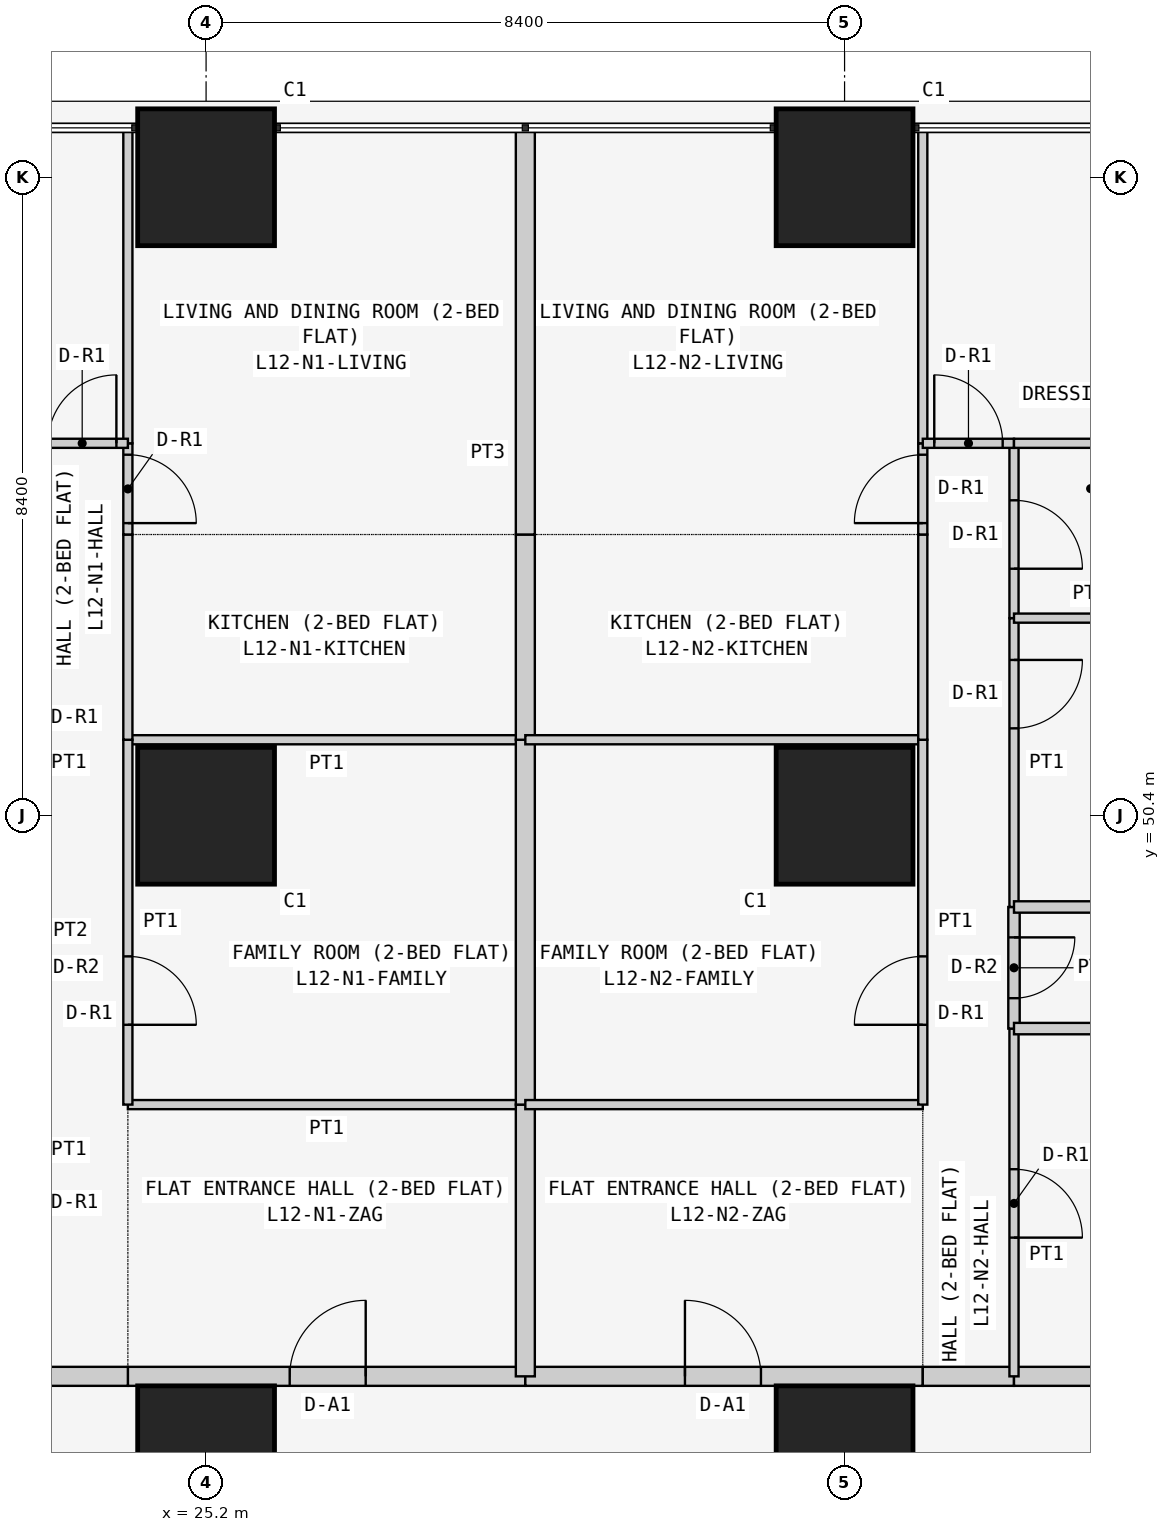
"""IFC4 building model, lengths in metres.
Left out: names, types, materials, properties, quantities, classifications, styles, units other than length and angle.
Written with IfcOpenShell. Run it as: python <this file> out.ifc"""

import sys

from ifc_helpers import new_model, si_unit, direction, frame, frame_2d, origin, origin_2d, place, context, subcontext, project, spatial, rectangle, extrude, element, fill, save


model = new_model("IFC4")
c1 = context("Model", 3, precision=1e-05, world=origin(), true_north=direction((0.0, 1.0)))
c2 = subcontext(c1, "Body", "Model", "MODEL_VIEW")
j1 = project(units=[si_unit("LENGTHUNIT", "METRE"), si_unit("PLANEANGLEUNIT", "RADIAN")], contexts=[c1])
p1 = place(None, origin())
s1 = spatial("IfcSite", under=j1, at=p1, CompositionType="ELEMENT")
p2 = place(p1, origin())
s2 = spatial("IfcBuilding", under=s1, at=p2, CompositionType="ELEMENT")
p3 = place(p2, frame((0.0, 0.0, 52.5)))
s3 = spatial("IfcBuildingStorey", under=s2, at=p3, CompositionType="ELEMENT", Elevation=52.5)
for number, where, z_axis, x_axis in (
    (1, (25.2, 42.0, 0.0), (0.0, 0.0, 1.0), (1.0, 0.0, 0.0)),
    (2, (25.2, 50.4, 0.0), (0.0, 0.0, 1.0), (1.0, 0.0, 0.0)),
    (3, (25.2, 58.8, 0.0), (0.0, 0.0, 1.0), (1.0, 0.0, 0.0)),
    (4, (33.6, 42.0, 0.0), (0.0, 0.0, 1.0), (1.0, 0.0, 0.0)),
    (5, (33.6, 50.4, 0.0), (0.0, 0.0, 1.0), (1.0, 0.0, 0.0)),
    (6, (33.6, 58.8, 0.0), (0.0, 0.0, 1.0), (1.0, 0.0, 0.0)),
):
    element("IfcColumn", number, at=place(p3, frame(where, z_axis=z_axis, x_axis=x_axis)), inside=s3, PredefinedType="COLUMN", context=c2, shape_type="SweptSolid", body=[
        extrude(rectangle(XDim=1.8, YDim=1.8, at=origin_2d()), origin(), (0.0, 0.0, 1.0), 3.6),
    ])
p4 = place(p3, frame((24.171, 43.025, 0.0), z_axis=(0.0, 0.0, 1.0), x_axis=(1.0, 0.0, 0.0)))
e7 = element("IfcWall", 7, at=p4, inside=s3, PredefinedType="PARTITIONING", context=c2, shape_type="SweptSolid", body=[
    extrude(rectangle(XDim=5.229, YDim=0.25, at=frame_2d((2.615, 0.0))), origin(), (0.0, 0.0, 1.0), 3.45),
])
p5 = place(p4, frame((2.129, 0.0, 0.0)))
e8 = element("IfcOpeningElement", 8, at=p5, cuts=e7, PredefinedType="OPENING", context=c2, shape_type="SweptSolid", body=[
    extrude(rectangle(XDim=1.0, YDim=2.1, at=frame_2d((0.5, 1.05))), frame((0.0, 0.135, 0.0), z_axis=(0.0, -1.0, 0.0), x_axis=(1.0, 0.0, 0.0)), (0.0, 0.0, 1.0), 0.27),
])
p6 = place(p3, frame((22.971, 43.025, 0.0), z_axis=(0.0, 0.0, 1.0), x_axis=(1.0, 0.0, 0.0)))
e9 = element("IfcWall", 9, at=p6, inside=s3, PredefinedType="PARTITIONING", context=c2, shape_type="SweptSolid", body=[
    extrude(rectangle(XDim=1.2, YDim=0.25, at=frame_2d((0.6, 0.0))), origin(), (0.0, 0.0, 1.0), 3.45),
])
p7 = place(p3, frame((29.4, 43.025, 0.0), z_axis=(0.0, 0.0, 1.0), x_axis=(1.0, 0.0, 0.0)))
e10 = element("IfcWall", 10, at=p7, inside=s3, PredefinedType="PARTITIONING", context=c2, shape_type="SweptSolid", body=[
    extrude(rectangle(XDim=5.229, YDim=0.25, at=frame_2d((2.615, 0.0))), origin(), (0.0, 0.0, 1.0), 3.45),
])
p8 = place(p7, frame((2.1, 0.0, 0.0)))
e11 = element("IfcOpeningElement", 11, at=p8, cuts=e10, PredefinedType="OPENING", context=c2, shape_type="SweptSolid", body=[
    extrude(rectangle(XDim=1.0, YDim=2.1, at=frame_2d((0.5, 1.05))), frame((0.0, 0.135, 0.0), z_axis=(0.0, -1.0, 0.0), x_axis=(1.0, 0.0, 0.0)), (0.0, 0.0, 1.0), 0.27),
])
p9 = place(p3, frame((34.629, 43.025, 0.0), z_axis=(0.0, 0.0, 1.0), x_axis=(1.0, 0.0, 0.0)))
e12 = element("IfcWall", 12, at=p9, inside=s3, PredefinedType="PARTITIONING", context=c2, shape_type="SweptSolid", body=[
    extrude(rectangle(XDim=1.2, YDim=0.25, at=frame_2d((0.6, 0.0))), origin(), (0.0, 0.0, 1.0), 3.45),
])
p10 = place(p3, frame((35.829, 43.025, 0.0), z_axis=(0.0, 0.0, 1.0), x_axis=(1.0, 0.0, 0.0)))
e13 = element("IfcWall", 13, at=p10, inside=s3, PredefinedType="PARTITIONING", context=c2, shape_type="SweptSolid", body=[
    extrude(rectangle(XDim=6.871, YDim=0.25, at=frame_2d((3.436, 0.0))), origin(), (0.0, 0.0, 1.0), 3.45),
])
p11 = place(p3, frame((29.4, 46.6, 0.0), z_axis=(0.0, 0.0, 1.0), x_axis=(-1.0, 0.0, 0.0)))
e14 = element("IfcWall", 14, at=p11, inside=s3, PredefinedType="PARTITIONING", context=c2, shape_type="SweptSolid", body=[
    extrude(rectangle(XDim=5.229, YDim=0.12, at=frame_2d((2.615, 0.0))), origin(), (0.0, 0.0, 1.0), 3.45),
])
p12 = place(p3, frame((29.4, 43.025, 0.0), z_axis=(0.0, 0.0, 1.0), x_axis=(0.0, 1.0, 0.0)))
e15 = element("IfcWall", 15, at=p12, inside=s3, PredefinedType="PARTITIONING", context=c2, shape_type="SweptSolid", body=[
    extrude(rectangle(XDim=3.575, YDim=0.25, at=frame_2d((1.788, 0.0))), origin(), (0.0, 0.0, 1.0), 2.848),
])
p13 = place(p3, frame((29.4, 51.4, 0.0), z_axis=(0.0, 0.0, 1.0), x_axis=(-1.0, 0.0, 0.0)))
e16 = element("IfcWall", 16, at=p13, inside=s3, PredefinedType="PARTITIONING", context=c2, shape_type="SweptSolid", body=[
    extrude(rectangle(XDim=5.229, YDim=0.12, at=frame_2d((2.615, 0.0))), origin(), (0.0, 0.0, 1.0), 3.45),
])
p14 = place(p3, frame((24.171, 51.4, 0.0), z_axis=(0.0, 0.0, 1.0), x_axis=(0.0, -1.0, 0.0)))
e17 = element("IfcWall", 17, at=p14, inside=s3, PredefinedType="PARTITIONING", context=c2, shape_type="SweptSolid", body=[
    extrude(rectangle(XDim=4.8, YDim=0.12, at=frame_2d((2.4, 0.0))), origin(), (0.0, 0.0, 1.0), 3.45),
])
p15 = place(p14, frame((2.85, 0.0, 0.0)))
e18 = element("IfcOpeningElement", 18, at=p15, cuts=e17, PredefinedType="OPENING", context=c2, shape_type="SweptSolid", body=[
    extrude(rectangle(XDim=0.9, YDim=2.1, at=frame_2d((0.45, 1.05))), frame((0.0, 0.07, 0.0), z_axis=(0.0, -1.0, 0.0), x_axis=(1.0, 0.0, 0.0)), (0.0, 0.0, 1.0), 0.14),
])
p16 = place(p3, frame((29.4, 46.6, 0.0), z_axis=(0.0, 0.0, 1.0), x_axis=(0.0, 1.0, 0.0)))
e19 = element("IfcWall", 19, at=p16, inside=s3, PredefinedType="PARTITIONING", context=c2, shape_type="SweptSolid", body=[
    extrude(rectangle(XDim=4.8, YDim=0.25, at=frame_2d((2.4, 0.0))), origin(), (0.0, 0.0, 1.0), 2.848),
])
p17 = place(p3, frame((24.171, 54.1, 0.0), z_axis=(0.0, 0.0, 1.0), x_axis=(0.0, -1.0, 0.0)))
e20 = element("IfcWall", 20, at=p17, inside=s3, PredefinedType="PARTITIONING", context=c2, shape_type="SweptSolid", body=[
    extrude(rectangle(XDim=2.7, YDim=0.12, at=frame_2d((1.35, 0.0))), origin(), (0.0, 0.0, 1.0), 3.45),
])
p18 = place(p3, frame((29.4, 51.4, 0.0), z_axis=(0.0, 0.0, 1.0), x_axis=(0.0, 1.0, 0.0)))
e21 = element("IfcWall", 21, at=p18, inside=s3, PredefinedType="PARTITIONING", context=c2, shape_type="SweptSolid", body=[
    extrude(rectangle(XDim=2.7, YDim=0.25, at=frame_2d((1.35, 0.0))), origin(), (0.0, 0.0, 1.0), 2.848),
])
p19 = place(p3, frame((24.171, 55.3, 0.0), z_axis=(0.0, 0.0, 1.0), x_axis=(0.0, -1.0, 0.0)))
e22 = element("IfcWall", 22, at=p19, inside=s3, PredefinedType="PARTITIONING", context=c2, shape_type="SweptSolid", body=[
    extrude(rectangle(XDim=1.2, YDim=0.12, at=frame_2d((0.6, 0.0))), origin(), (0.0, 0.0, 1.0), 3.45),
])
p20 = place(p19, frame((0.15, 0.0, 0.0)))
e23 = element("IfcOpeningElement", 23, at=p20, cuts=e22, PredefinedType="OPENING", context=c2, shape_type="SweptSolid", body=[
    extrude(rectangle(XDim=0.9, YDim=2.1, at=frame_2d((0.45, 1.05))), frame((0.0, 0.07, 0.0), z_axis=(0.0, -1.0, 0.0), x_axis=(1.0, 0.0, 0.0)), (0.0, 0.0, 1.0), 0.14),
])
p21 = place(p3, frame((24.171, 59.45, 0.0), z_axis=(0.0, 0.0, 1.0), x_axis=(0.0, -1.0, 0.0)))
e24 = element("IfcWall", 24, at=p21, inside=s3, PredefinedType="PARTITIONING", context=c2, shape_type="SweptSolid", body=[
    extrude(rectangle(XDim=4.15, YDim=0.12, at=frame_2d((2.075, 0.0))), origin(), (0.0, 0.0, 1.0), 3.45),
])
p22 = place(p3, frame((29.4, 54.1, 0.0), z_axis=(0.0, 0.0, 1.0), x_axis=(0.0, 1.0, 0.0)))
e25 = element("IfcWall", 25, at=p22, inside=s3, PredefinedType="PARTITIONING", context=c2, shape_type="SweptSolid", body=[
    extrude(rectangle(XDim=5.35, YDim=0.25, at=frame_2d((2.675, 0.0))), origin(), (0.0, 0.0, 1.0), 2.848),
])
p23 = place(p3, frame((24.171, 55.3, 0.0), z_axis=(0.0, 0.0, 1.0), x_axis=(-1.0, 0.0, 0.0)))
e26 = element("IfcWall", 26, at=p23, inside=s3, PredefinedType="PARTITIONING", context=c2, shape_type="SweptSolid", body=[
    extrude(rectangle(XDim=1.2, YDim=0.12, at=frame_2d((0.6, 0.0))), origin(), (0.0, 0.0, 1.0), 3.45),
])
p24 = place(p23, frame((0.151, 0.0, 0.0)))
e27 = element("IfcOpeningElement", 27, at=p24, cuts=e26, PredefinedType="OPENING", context=c2, shape_type="SweptSolid", body=[
    extrude(rectangle(XDim=0.9, YDim=2.1, at=frame_2d((0.45, 1.05))), frame((0.0, 0.07, 0.0), z_axis=(0.0, -1.0, 0.0), x_axis=(1.0, 0.0, 0.0)), (0.0, 0.0, 1.0), 0.14),
])
for number, where, z_axis, x_axis in (
    (28, (29.4, 46.6, 0.0), (0.0, 0.0, 1.0), (1.0, 0.0, 0.0)),
    (29, (29.4, 51.4, 0.0), (0.0, 0.0, 1.0), (1.0, 0.0, 0.0)),
):
    element("IfcWall", number, at=place(p3, frame(where, z_axis=z_axis, x_axis=x_axis)), inside=s3, PredefinedType="PARTITIONING", context=c2, shape_type="SweptSolid", body=[
        extrude(rectangle(XDim=5.229, YDim=0.12, at=frame_2d((2.615, 0.0))), origin(), (0.0, 0.0, 1.0), 3.45),
    ])
p25 = place(p3, frame((34.629, 51.4, 0.0), z_axis=(0.0, 0.0, 1.0), x_axis=(0.0, -1.0, 0.0)))
e30 = element("IfcWall", 30, at=p25, inside=s3, PredefinedType="PARTITIONING", context=c2, shape_type="SweptSolid", body=[
    extrude(rectangle(XDim=4.8, YDim=0.12, at=frame_2d((2.4, 0.0))), origin(), (0.0, 0.0, 1.0), 3.45),
])
p26 = place(p25, frame((2.85, 0.0, 0.0)))
e31 = element("IfcOpeningElement", 31, at=p26, cuts=e30, PredefinedType="OPENING", context=c2, shape_type="SweptSolid", body=[
    extrude(rectangle(XDim=0.9, YDim=2.1, at=frame_2d((0.45, 1.05))), frame((0.0, 0.07, 0.0), z_axis=(0.0, -1.0, 0.0), x_axis=(1.0, 0.0, 0.0)), (0.0, 0.0, 1.0), 0.14),
])
p27 = place(p3, frame((34.629, 54.1, 0.0), z_axis=(0.0, 0.0, 1.0), x_axis=(0.0, -1.0, 0.0)))
e32 = element("IfcWall", 32, at=p27, inside=s3, PredefinedType="PARTITIONING", context=c2, shape_type="SweptSolid", body=[
    extrude(rectangle(XDim=2.7, YDim=0.12, at=frame_2d((1.35, 0.0))), origin(), (0.0, 0.0, 1.0), 3.45),
])
p28 = place(p3, frame((34.629, 55.3, 0.0), z_axis=(0.0, 0.0, 1.0), x_axis=(0.0, -1.0, 0.0)))
e33 = element("IfcWall", 33, at=p28, inside=s3, PredefinedType="PARTITIONING", context=c2, shape_type="SweptSolid", body=[
    extrude(rectangle(XDim=1.2, YDim=0.12, at=frame_2d((0.6, 0.0))), origin(), (0.0, 0.0, 1.0), 3.45),
])
p29 = place(p28, frame((0.15, 0.0, 0.0)))
e34 = element("IfcOpeningElement", 34, at=p29, cuts=e33, PredefinedType="OPENING", context=c2, shape_type="SweptSolid", body=[
    extrude(rectangle(XDim=0.9, YDim=2.1, at=frame_2d((0.45, 1.05))), frame((0.0, 0.07, 0.0), z_axis=(0.0, -1.0, 0.0), x_axis=(1.0, 0.0, 0.0)), (0.0, 0.0, 1.0), 0.14),
])
p30 = place(p3, frame((34.629, 59.45, 0.0), z_axis=(0.0, 0.0, 1.0), x_axis=(0.0, -1.0, 0.0)))
e35 = element("IfcWall", 35, at=p30, inside=s3, PredefinedType="PARTITIONING", context=c2, shape_type="SweptSolid", body=[
    extrude(rectangle(XDim=4.15, YDim=0.12, at=frame_2d((2.075, 0.0))), origin(), (0.0, 0.0, 1.0), 3.45),
])
p31 = place(p3, frame((35.829, 47.6, 0.0), z_axis=(0.0, 0.0, 1.0), x_axis=(0.0, -1.0, 0.0)))
e36 = element("IfcWall", 36, at=p31, inside=s3, PredefinedType="PARTITIONING", context=c2, shape_type="SweptSolid", body=[
    extrude(rectangle(XDim=4.575, YDim=0.12, at=frame_2d((2.288, 0.0))), origin(), (0.0, 0.0, 1.0), 3.45),
])
p32 = place(p31, frame((1.85, 0.0, 0.0)))
e37 = element("IfcOpeningElement", 37, at=p32, cuts=e36, PredefinedType="OPENING", context=c2, shape_type="SweptSolid", body=[
    extrude(rectangle(XDim=0.9, YDim=2.1, at=frame_2d((0.45, 1.05))), frame((0.0, 0.07, 0.0), z_axis=(0.0, -1.0, 0.0), x_axis=(1.0, 0.0, 0.0)), (0.0, 0.0, 1.0), 0.14),
])
p33 = place(p3, frame((35.829, 49.2, 0.0), z_axis=(0.0, 0.0, 1.0), x_axis=(0.0, -1.0, 0.0)))
e38 = element("IfcWall", 38, at=p33, inside=s3, PredefinedType="PARTITIONING", context=c2, shape_type="SweptSolid", body=[
    extrude(rectangle(XDim=1.6, YDim=0.15, at=frame_2d((0.8, 0.0))), origin(), (0.0, 0.0, 1.0), 3.45),
])
p34 = place(p33, frame((0.4, 0.0, 0.0)))
e39 = element("IfcOpeningElement", 39, at=p34, cuts=e38, PredefinedType="OPENING", context=c2, shape_type="SweptSolid", body=[
    extrude(rectangle(XDim=0.8, YDim=2.1, at=frame_2d((0.4, 1.05))), frame((0.0, 0.085, 0.0), z_axis=(0.0, -1.0, 0.0), x_axis=(1.0, 0.0, 0.0)), (0.0, 0.0, 1.0), 0.17),
])
p35 = place(p3, frame((35.829, 53.0, 0.0), z_axis=(0.0, 0.0, 1.0), x_axis=(0.0, -1.0, 0.0)))
e40 = element("IfcWall", 40, at=p35, inside=s3, PredefinedType="PARTITIONING", context=c2, shape_type="SweptSolid", body=[
    extrude(rectangle(XDim=3.8, YDim=0.12, at=frame_2d((1.9, 0.0))), origin(), (0.0, 0.0, 1.0), 3.45),
])
p36 = place(p35, frame((0.55, 0.0, 0.0)))
e41 = element("IfcOpeningElement", 41, at=p36, cuts=e40, PredefinedType="OPENING", context=c2, shape_type="SweptSolid", body=[
    extrude(rectangle(XDim=0.9, YDim=2.1, at=frame_2d((0.45, 1.05))), frame((0.0, 0.07, 0.0), z_axis=(0.0, -1.0, 0.0), x_axis=(1.0, 0.0, 0.0)), (0.0, 0.0, 1.0), 0.14),
])
p37 = place(p3, frame((35.829, 55.3, 0.0), z_axis=(0.0, 0.0, 1.0), x_axis=(0.0, -1.0, 0.0)))
e42 = element("IfcWall", 42, at=p37, inside=s3, PredefinedType="PARTITIONING", context=c2, shape_type="SweptSolid", body=[
    extrude(rectangle(XDim=2.3, YDim=0.12, at=frame_2d((1.15, 0.0))), origin(), (0.0, 0.0, 1.0), 3.45),
])
p38 = place(p37, frame((0.75, 0.0, 0.0)))
e43 = element("IfcOpeningElement", 43, at=p38, cuts=e42, PredefinedType="OPENING", context=c2, shape_type="SweptSolid", body=[
    extrude(rectangle(XDim=0.9, YDim=2.1, at=frame_2d((0.45, 1.05))), frame((0.0, 0.07, 0.0), z_axis=(0.0, -1.0, 0.0), x_axis=(1.0, 0.0, 0.0)), (0.0, 0.0, 1.0), 0.14),
])
p39 = place(p3, frame((34.629, 55.3, 0.0), z_axis=(0.0, 0.0, 1.0), x_axis=(1.0, 0.0, 0.0)))
e44 = element("IfcWall", 44, at=p39, inside=s3, PredefinedType="PARTITIONING", context=c2, shape_type="SweptSolid", body=[
    extrude(rectangle(XDim=1.2, YDim=0.12, at=frame_2d((0.6, 0.0))), origin(), (0.0, 0.0, 1.0), 3.45),
])
p40 = place(p39, frame((0.151, 0.0, 0.0)))
e45 = element("IfcOpeningElement", 45, at=p40, cuts=e44, PredefinedType="OPENING", context=c2, shape_type="SweptSolid", body=[
    extrude(rectangle(XDim=0.9, YDim=2.1, at=frame_2d((0.45, 1.05))), frame((0.0, 0.07, 0.0), z_axis=(0.0, -1.0, 0.0), x_axis=(1.0, 0.0, 0.0)), (0.0, 0.0, 1.0), 0.14),
])
for number, where, z_axis, x_axis in (
    (46, (35.829, 47.6, 0.0), (0.0, 0.0, 1.0), (1.0, 0.0, 0.0)),
    (47, (35.829, 49.2, 0.0), (0.0, 0.0, 1.0), (1.0, 0.0, 0.0)),
):
    element("IfcWall", number, at=place(p3, frame(where, z_axis=z_axis, x_axis=x_axis)), inside=s3, PredefinedType="PARTITIONING", context=c2, shape_type="SweptSolid", body=[
        extrude(rectangle(XDim=6.871, YDim=0.15, at=frame_2d((3.436, 0.0))), origin(), (0.0, 0.0, 1.0), 3.45),
    ])
for number, where, z_axis, x_axis in (
    (48, (35.829, 53.0, 0.0), (0.0, 0.0, 1.0), (1.0, 0.0, 0.0)),
    (49, (35.829, 55.3, 0.0), (0.0, 0.0, 1.0), (1.0, 0.0, 0.0)),
):
    element("IfcWall", number, at=place(p3, frame(where, z_axis=z_axis, x_axis=x_axis)), inside=s3, PredefinedType="PARTITIONING", context=c2, shape_type="SweptSolid", body=[
        extrude(rectangle(XDim=2.0, YDim=0.12, at=frame_2d((1.0, 0.0))), origin(), (0.0, 0.0, 1.0), 3.45),
    ])
p41 = place(p5, origin())
e50 = element("IfcDoor", 50, at=p41, inside=s3, OperationType="SINGLE_SWING_RIGHT", PredefinedType="DOOR", context=c2, shape_type="SweptSolid", body=[
    extrude(rectangle(XDim=1.0, YDim=2.1, at=frame_2d((0.5, 1.05))), frame((0.0, 0.025, 0.0), z_axis=(0.0, -1.0, 0.0), x_axis=(1.0, 0.0, 0.0)), (0.0, 0.0, 1.0), 0.05),
])
fill(e8, e50)
p42 = place(p15, origin())
e51 = element("IfcDoor", 51, at=p42, inside=s3, OperationType="SINGLE_SWING_RIGHT", PredefinedType="DOOR", context=c2, shape_type="SweptSolid", body=[
    extrude(rectangle(XDim=0.9, YDim=2.1, at=frame_2d((0.45, 1.05))), frame((0.0, 0.025, 0.0), z_axis=(0.0, -1.0, 0.0), x_axis=(1.0, 0.0, 0.0)), (0.0, 0.0, 1.0), 0.05),
])
fill(e18, e51)
p43 = place(p20, origin())
e52 = element("IfcDoor", 52, at=p43, inside=s3, OperationType="SINGLE_SWING_RIGHT", PredefinedType="DOOR", context=c2, shape_type="SweptSolid", body=[
    extrude(rectangle(XDim=0.9, YDim=2.1, at=frame_2d((0.45, 1.05))), frame((0.0, 0.025, 0.0), z_axis=(0.0, -1.0, 0.0), x_axis=(1.0, 0.0, 0.0)), (0.0, 0.0, 1.0), 0.05),
])
fill(e23, e52)
p44 = place(p24, frame((0.9, 0.0, 0.0), z_axis=(0.0, 0.0, 1.0), x_axis=(-1.0, 0.0, 0.0)))
e53 = element("IfcDoor", 53, at=p44, inside=s3, OperationType="SINGLE_SWING_RIGHT", PredefinedType="DOOR", context=c2, shape_type="SweptSolid", body=[
    extrude(rectangle(XDim=0.9, YDim=2.1, at=frame_2d((0.45, 1.05))), frame((0.0, 0.025, 0.0), z_axis=(0.0, -1.0, 0.0), x_axis=(1.0, 0.0, 0.0)), (0.0, 0.0, 1.0), 0.05),
])
fill(e27, e53)
p45 = place(p8, origin())
e54 = element("IfcDoor", 54, at=p45, inside=s3, OperationType="SINGLE_SWING_LEFT", PredefinedType="DOOR", context=c2, shape_type="SweptSolid", body=[
    extrude(rectangle(XDim=1.0, YDim=2.1, at=frame_2d((0.5, 1.05))), frame((0.0, 0.025, 0.0), z_axis=(0.0, -1.0, 0.0), x_axis=(1.0, 0.0, 0.0)), (0.0, 0.0, 1.0), 0.05),
])
fill(e11, e54)
p46 = place(p26, frame((0.9, 0.0, 0.0), z_axis=(0.0, 0.0, 1.0), x_axis=(-1.0, 0.0, 0.0)))
e55 = element("IfcDoor", 55, at=p46, inside=s3, OperationType="SINGLE_SWING_LEFT", PredefinedType="DOOR", context=c2, shape_type="SweptSolid", body=[
    extrude(rectangle(XDim=0.9, YDim=2.1, at=frame_2d((0.45, 1.05))), frame((0.0, 0.025, 0.0), z_axis=(0.0, -1.0, 0.0), x_axis=(1.0, 0.0, 0.0)), (0.0, 0.0, 1.0), 0.05),
])
fill(e31, e55)
p47 = place(p29, frame((0.9, 0.0, 0.0), z_axis=(0.0, 0.0, 1.0), x_axis=(-1.0, 0.0, 0.0)))
e56 = element("IfcDoor", 56, at=p47, inside=s3, OperationType="SINGLE_SWING_LEFT", PredefinedType="DOOR", context=c2, shape_type="SweptSolid", body=[
    extrude(rectangle(XDim=0.9, YDim=2.1, at=frame_2d((0.45, 1.05))), frame((0.0, 0.025, 0.0), z_axis=(0.0, -1.0, 0.0), x_axis=(1.0, 0.0, 0.0)), (0.0, 0.0, 1.0), 0.05),
])
fill(e34, e56)
p48 = place(p32, origin())
e57 = element("IfcDoor", 57, at=p48, inside=s3, OperationType="SINGLE_SWING_RIGHT", PredefinedType="DOOR", context=c2, shape_type="SweptSolid", body=[
    extrude(rectangle(XDim=0.9, YDim=2.1, at=frame_2d((0.45, 1.05))), frame((0.0, 0.025, 0.0), z_axis=(0.0, -1.0, 0.0), x_axis=(1.0, 0.0, 0.0)), (0.0, 0.0, 1.0), 0.05),
])
fill(e37, e57)
p49 = place(p34, origin())
e58 = element("IfcDoor", 58, at=p49, inside=s3, OperationType="SINGLE_SWING_LEFT", PredefinedType="DOOR", context=c2, shape_type="SweptSolid", body=[
    extrude(rectangle(XDim=0.8, YDim=2.1, at=frame_2d((0.4, 1.05))), frame((0.0, 0.025, 0.0), z_axis=(0.0, -1.0, 0.0), x_axis=(1.0, 0.0, 0.0)), (0.0, 0.0, 1.0), 0.05),
])
fill(e39, e58)
p50 = place(p36, origin())
e59 = element("IfcDoor", 59, at=p50, inside=s3, OperationType="SINGLE_SWING_LEFT", PredefinedType="DOOR", context=c2, shape_type="SweptSolid", body=[
    extrude(rectangle(XDim=0.9, YDim=2.1, at=frame_2d((0.45, 1.05))), frame((0.0, 0.025, 0.0), z_axis=(0.0, -1.0, 0.0), x_axis=(1.0, 0.0, 0.0)), (0.0, 0.0, 1.0), 0.05),
])
fill(e41, e59)
p51 = place(p38, origin())
e60 = element("IfcDoor", 60, at=p51, inside=s3, OperationType="SINGLE_SWING_RIGHT", PredefinedType="DOOR", context=c2, shape_type="SweptSolid", body=[
    extrude(rectangle(XDim=0.9, YDim=2.1, at=frame_2d((0.45, 1.05))), frame((0.0, 0.025, 0.0), z_axis=(0.0, -1.0, 0.0), x_axis=(1.0, 0.0, 0.0)), (0.0, 0.0, 1.0), 0.05),
])
fill(e43, e60)
p52 = place(p40, origin())
e61 = element("IfcDoor", 61, at=p52, inside=s3, OperationType="SINGLE_SWING_LEFT", PredefinedType="DOOR", context=c2, shape_type="SweptSolid", body=[
    extrude(rectangle(XDim=0.9, YDim=2.1, at=frame_2d((0.45, 1.05))), frame((0.0, 0.025, 0.0), z_axis=(0.0, -1.0, 0.0), x_axis=(1.0, 0.0, 0.0)), (0.0, 0.0, 1.0), 0.05),
])
fill(e45, e61)
save(model, sys.argv[1])
